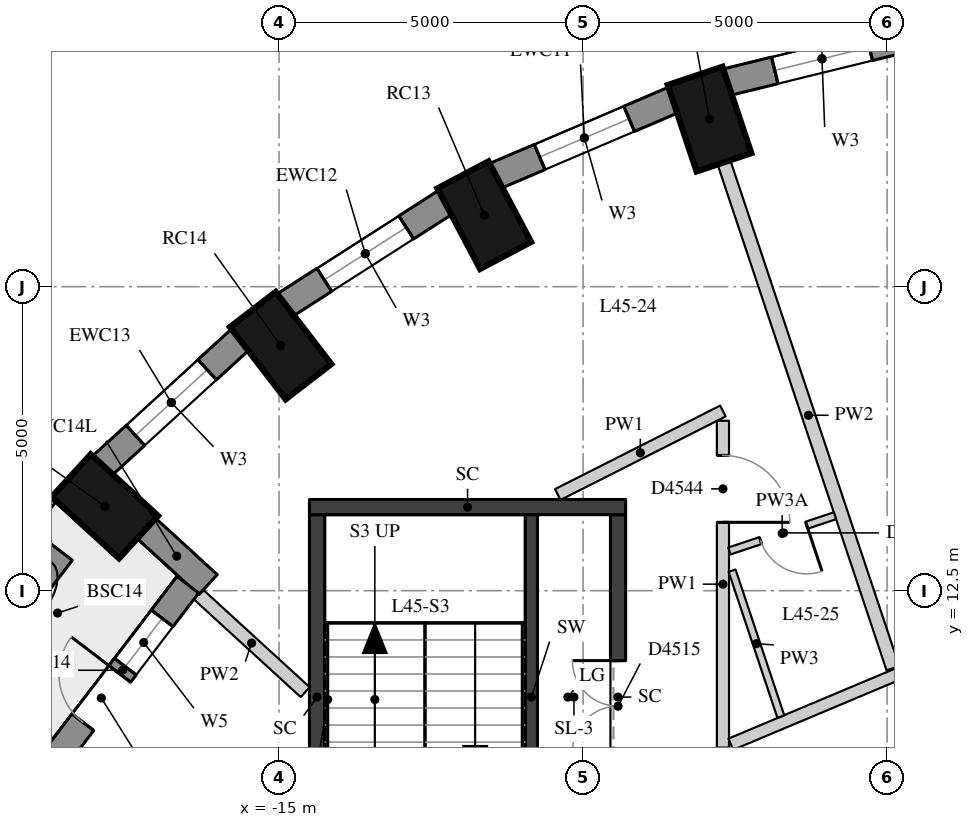
"""IFC4 building model, lengths in metres.
Left out: names, types, materials, properties, quantities, classifications, styles, units other than length and angle.
Written with IfcOpenShell. Run it as: python <this file> out.ifc"""

import sys

from ifc_helpers import new_model, si_unit, direction, frame, frame_2d, origin, origin_2d, place, context, subcontext, project, spatial, rectangle, extrude, element, fill, save


model = new_model("IFC4")
c1 = context("Model", 3, precision=1e-05, world=origin(), true_north=direction((0.0, 1.0)))
c2 = subcontext(c1, "Body", "Model", "MODEL_VIEW")
j1 = project(units=[si_unit("LENGTHUNIT", "METRE"), si_unit("PLANEANGLEUNIT", "RADIAN")], contexts=[c1])
p1 = place(None, origin())
s1 = spatial("IfcSite", under=j1, at=p1, CompositionType="ELEMENT")
p2 = place(p1, origin())
s2 = spatial("IfcBuilding", under=s1, at=p2, CompositionType="ELEMENT")
p3 = place(p2, frame((0.0, 0.0, 161.6)))
s3 = spatial("IfcBuildingStorey", under=s2, at=p3, CompositionType="ELEMENT", Elevation=161.6)
for number, where, z_axis, x_axis in (
    (1, (-7.92, 20.256, 0.0), (0.0, 0.0, 1.0), (-0.317, 0.949, 0.0)),
    (2, (-11.625, 18.676, 0.0), (0.0, 0.0, 1.0), (-0.468, 0.884, 0.0)),
    (3, (-14.973, 16.532, 0.0), (0.0, 0.0, 1.0), (-0.61, 0.792, 0.0)),
    (4, (-17.864, 13.888, 0.0), (0.0, 0.0, 1.0), (-0.738, 0.675, 0.0)),
):
    element("IfcColumn", number, at=place(p3, frame(where, z_axis=z_axis, x_axis=x_axis)), inside=s3, PredefinedType="COLUMN", context=c2, shape_type="SweptSolid", body=[
        extrude(rectangle(XDim=1.5, YDim=0.95, at=origin_2d()), origin(), (0.0, 0.0, 1.0), 3.3),
    ])
p4 = place(p3, frame((-4.499, 21.633, 0.0), z_axis=(0.0, 0.0, 1.0), x_axis=(-0.971232901476, -0.238131583563, 0.0)))
e5 = element("IfcWall", 5, at=p4, inside=s3, PredefinedType="SOLIDWALL", context=c2, shape_type="SweptSolid", body=[
    extrude(rectangle(XDim=3.237, YDim=0.45, at=frame_2d((1.618, 0.0))), origin(), (0.0, 0.0, 1.0), 3.02),
])
p5 = place(p4, frame((0.818, 0.0, 0.4)))
e6 = element("IfcOpeningElement", 6, at=p5, cuts=e5, PredefinedType="OPENING", context=c2, shape_type="SweptSolid", body=[
    extrude(rectangle(XDim=1.6, YDim=1.75, at=frame_2d((0.8, 0.875))), frame((0.0, 0.235, 0.0), z_axis=(0.0, -1.0, 0.0), x_axis=(1.0, 0.0, 0.0)), (0.0, 0.0, 1.0), 0.47),
])
p6 = place(p3, frame((-8.506, 20.574, 0.0), z_axis=(0.0, 0.0, 1.0), x_axis=(-0.919798725687, -0.392390499663, 0.0)))
e7 = element("IfcWall", 7, at=p6, inside=s3, PredefinedType="SOLIDWALL", context=c2, shape_type="SweptSolid", body=[
    extrude(rectangle(XDim=3.2, YDim=0.45, at=frame_2d((1.6, 0.0))), origin(), (0.0, 0.0, 1.0), 3.02),
])
p7 = place(p6, frame((0.8, 0.0, 0.4)))
e8 = element("IfcOpeningElement", 8, at=p7, cuts=e7, PredefinedType="OPENING", context=c2, shape_type="SweptSolid", body=[
    extrude(rectangle(XDim=1.6, YDim=1.75, at=frame_2d((0.8, 0.875))), frame((0.0, 0.235, 0.0), z_axis=(0.0, -1.0, 0.0), x_axis=(1.0, 0.0, 0.0)), (0.0, 0.0, 1.0), 0.47),
])
p8 = place(p3, frame((-12.255, 18.893, 0.0), z_axis=(0.0, 0.0, 1.0), x_axis=(-0.842030726237, -0.539429565442, 0.0)))
e9 = element("IfcWall", 9, at=p8, inside=s3, PredefinedType="SOLIDWALL", context=c2, shape_type="SweptSolid", body=[
    extrude(rectangle(XDim=3.151, YDim=0.45, at=frame_2d((1.576, 0.0))), origin(), (0.0, 0.0, 1.0), 3.02),
])
p9 = place(p8, frame((0.776, 0.0, 0.4)))
e10 = element("IfcOpeningElement", 10, at=p9, cuts=e9, PredefinedType="OPENING", context=c2, shape_type="SweptSolid", body=[
    extrude(rectangle(XDim=1.6, YDim=1.75, at=frame_2d((0.8, 0.875))), frame((0.0, 0.235, 0.0), z_axis=(0.0, -1.0, 0.0), x_axis=(1.0, 0.0, 0.0)), (0.0, 0.0, 1.0), 0.47),
])
p10 = place(p3, frame((-15.63, 16.639, 0.0), z_axis=(0.0, 0.0, 1.0), x_axis=(-0.737808755941, -0.675009807082, 0.0)))
e11 = element("IfcWall", 11, at=p10, inside=s3, PredefinedType="SOLIDWALL", context=c2, shape_type="SweptSolid", body=[
    extrude(rectangle(XDim=3.094, YDim=0.45, at=frame_2d((1.547, 0.0))), origin(), (0.0, 0.0, 1.0), 3.02),
])
p11 = place(p10, frame((0.747, 0.0, 0.4)))
e12 = element("IfcOpeningElement", 12, at=p11, cuts=e11, PredefinedType="OPENING", context=c2, shape_type="SweptSolid", body=[
    extrude(rectangle(XDim=1.6, YDim=1.75, at=frame_2d((0.8, 0.875))), frame((0.0, 0.235, 0.0), z_axis=(0.0, -1.0, 0.0), x_axis=(1.0, 0.0, 0.0)), (0.0, 0.0, 1.0), 0.47),
])
p12 = place(p3, frame((-17.195, 13.537, 0.0), z_axis=(0.0, 0.0, 1.0), x_axis=(0.737918885826, -0.674889411638, 0.0)))
e13 = element("IfcWall", 13, at=p12, inside=s3, PredefinedType="SOLIDWALL", context=c2, shape_type="SweptSolid", body=[
    extrude(rectangle(XDim=1.391, YDim=0.45, at=frame_2d((0.695, 0.0))), origin(), (0.0, 0.0, 1.0), 3.02),
])
p13 = place(p3, frame((-16.501, 12.598, 0.0), z_axis=(0.0, 0.0, 1.0), x_axis=(-0.606778881252, -0.794870674554, 0.0)))
e14 = element("IfcWall", 14, at=p13, inside=s3, PredefinedType="SOLIDWALL", context=c2, shape_type="SweptSolid", body=[
    extrude(rectangle(XDim=3.538, YDim=0.45, at=frame_2d((1.769, 0.0))), origin(), (0.0, 0.0, 1.0), 3.02),
])
p14 = place(p13, frame((0.694, 0.0, 0.4)))
e15 = element("IfcOpeningElement", 15, at=p14, cuts=e14, PredefinedType="OPENING", context=c2, shape_type="SweptSolid", body=[
    extrude(rectangle(XDim=1.0, YDim=1.75, at=frame_2d((0.5, 0.875))), frame((0.0, 0.235, 0.0), z_axis=(0.0, -1.0, 0.0), x_axis=(1.0, 0.0, 0.0)), (0.0, 0.0, 1.0), 0.47),
])
p15 = place(p13, frame((1.844, 0.0, 0.0)))
e16 = element("IfcOpeningElement", 16, at=p15, cuts=e14, PredefinedType="OPENING", context=c2, shape_type="SweptSolid", body=[
    extrude(rectangle(XDim=1.0, YDim=2.15, at=frame_2d((0.5, 1.075))), frame((0.0, 0.235, 0.0), z_axis=(0.0, -1.0, 0.0), x_axis=(1.0, 0.0, 0.0)), (0.0, 0.0, 1.0), 0.47),
])
p16 = place(p3, frame((-18.626, 9.82, 0.0), z_axis=(0.0, 0.0, 1.0), x_axis=(-0.453241970186, -0.891387523169, 0.0)))
e17 = element("IfcWall", 17, at=p16, inside=s3, PredefinedType="SOLIDWALL", context=c2, shape_type="SweptSolid", body=[
    extrude(rectangle(XDim=3.493, YDim=0.45, at=frame_2d((1.747, 0.0))), origin(), (0.0, 0.0, 1.0), 3.02),
])
p17 = place(p16, frame((0.672, 0.0, 0.4)))
e18 = element("IfcOpeningElement", 18, at=p17, cuts=e17, PredefinedType="OPENING", context=c2, shape_type="SweptSolid", body=[
    extrude(rectangle(XDim=1.0, YDim=1.75, at=frame_2d((0.5, 0.875))), frame((0.0, 0.235, 0.0), z_axis=(0.0, -1.0, 0.0), x_axis=(1.0, 0.0, 0.0)), (0.0, 0.0, 1.0), 0.47),
])
p18 = place(p16, frame((1.822, 0.0, 0.0)))
e19 = element("IfcOpeningElement", 19, at=p18, cuts=e17, PredefinedType="OPENING", context=c2, shape_type="SweptSolid", body=[
    extrude(rectangle(XDim=1.0, YDim=2.15, at=frame_2d((0.5, 1.075))), frame((0.0, 0.235, 0.0), z_axis=(0.0, -1.0, 0.0), x_axis=(1.0, 0.0, 0.0)), (0.0, 0.0, 1.0), 0.47),
])
p19 = place(p3, frame((-18.678, 13.214, 0.0), z_axis=(0.0, 0.0, 1.0), x_axis=(-0.607762189494, -0.794119084912, 0.0)))
e20 = element("IfcWall", 20, at=p19, inside=s3, PredefinedType="USERDEFINED", context=c2, shape_type="SweptSolid", body=[
    extrude(rectangle(XDim=1.8, YDim=0.7, at=frame_2d((0.9, 0.0))), origin(), (0.0, 0.0, 1.0), 0.75),
])
p20 = place(p3, frame((-10.85, 7.75, 0.0), z_axis=(0.0, 0.0, 1.0), x_axis=(0.0, 1.0, 0.0)))
e21 = element("IfcWall", 21, at=p20, inside=s3, PredefinedType="SHEAR", context=c2, shape_type="SweptSolid", body=[
    extrude(rectangle(XDim=6.0, YDim=0.2, at=frame_2d((3.0, 0.0))), origin(), (0.0, 0.0, 1.0), 3.02),
])
p21 = place(p20, frame((0.1, 0.0, 0.0)))
e22 = element("IfcOpeningElement", 22, at=p21, cuts=e21, PredefinedType="OPENING", context=c2, shape_type="SweptSolid", body=[
    extrude(rectangle(XDim=1.5, YDim=2.1, at=frame_2d((0.75, 1.05))), frame((0.0, 0.11, 0.0), z_axis=(0.0, -1.0, 0.0), x_axis=(1.0, 0.0, 0.0)), (0.0, 0.0, 1.0), 0.22),
])
p22 = place(p3, frame((-14.375, 7.75, -0.28), z_axis=(0.0, 0.0, 1.0), x_axis=(0.0, 1.0, 0.0)))
e23 = element("IfcWall", 23, at=p22, inside=s3, PredefinedType="SHEAR", context=c2, shape_type="SweptSolid", body=[
    extrude(rectangle(XDim=6.0, YDim=0.25, at=frame_2d((3.0, 0.0))), origin(), (0.0, 0.0, 1.0), 3.3),
])
p23 = place(p3, frame((-9.425, 7.75, -0.28), z_axis=(0.0, 0.0, 1.0), x_axis=(0.0, 1.0, 0.0)))
e24 = element("IfcWall", 24, at=p23, inside=s3, PredefinedType="SHEAR", context=c2, shape_type="SweptSolid", body=[
    extrude(rectangle(XDim=6.0, YDim=0.25, at=frame_2d((3.0, 0.0))), origin(), (0.0, 0.0, 1.0), 3.3),
])
p24 = place(p23, frame((2.1, 0.0, 0.28)))
e25 = element("IfcOpeningElement", 25, at=p24, cuts=e24, PredefinedType="OPENING", context=c2, shape_type="SweptSolid", body=[
    extrude(rectangle(XDim=1.5, YDim=2.1, at=frame_2d((0.75, 1.05))), frame((0.0, 0.135, 0.0), z_axis=(0.0, -1.0, 0.0), x_axis=(1.0, 0.0, 0.0)), (0.0, 0.0, 1.0), 0.27),
])
p25 = place(p3, frame((-14.5, 13.875, -0.28), z_axis=(0.0, 0.0, 1.0), x_axis=(1.0, 0.0, 0.0)))
e26 = element("IfcWall", 26, at=p25, inside=s3, PredefinedType="SHEAR", context=c2, shape_type="SweptSolid", body=[
    extrude(rectangle(XDim=5.2, YDim=0.25, at=frame_2d((2.6, 0.0))), origin(), (0.0, 0.0, 1.0), 3.3),
])
p26 = place(p3, frame((-10.416, 14.082, 0.0), z_axis=(0.0, 0.0, 1.0), x_axis=(0.892396808139, 0.451251522793, 0.0)))
e27 = element("IfcWall", 27, at=p26, inside=s3, PredefinedType="PARTITIONING", context=c2, shape_type="SweptSolid", body=[
    extrude(rectangle(XDim=3.044, YDim=0.2, at=frame_2d((1.522, 0.0))), origin(), (0.0, 0.0, 1.0), 3.02),
])
p27 = place(p3, frame((-7.7, 15.295, 0.0), z_axis=(0.0, 0.0, 1.0), x_axis=(0.0, -1.0, 0.0)))
e28 = element("IfcWall", 28, at=p27, inside=s3, PredefinedType="PARTITIONING", context=c2, shape_type="SweptSolid", body=[
    extrude(rectangle(XDim=5.375, YDim=0.2, at=frame_2d((2.688, 0.0))), origin(), (0.0, 0.0, 1.0), 3.02),
])
p28 = place(p27, frame((0.57, 0.0, 0.0)))
e29 = element("IfcOpeningElement", 29, at=p28, cuts=e28, PredefinedType="OPENING", context=c2, shape_type="SweptSolid", body=[
    extrude(rectangle(XDim=1.1, YDim=2.1, at=frame_2d((0.55, 1.05))), frame((0.0, 0.11, 0.0), z_axis=(0.0, -1.0, 0.0), x_axis=(1.0, 0.0, 0.0)), (0.0, 0.0, 1.0), 0.22),
])
p29 = place(p3, frame((-7.57, 9.975, 0.0), z_axis=(0.0, 0.0, 1.0), x_axis=(0.921815879705, 0.387628022624, 0.0)))
e30 = element("IfcWall", 30, at=p29, inside=s3, PredefinedType="PARTITIONING", context=c2, shape_type="SweptSolid", body=[
    extrude(rectangle(XDim=8.321, YDim=0.2, at=frame_2d((4.16, 0.0))), origin(), (0.0, 0.0, 1.0), 3.02),
])
p30 = place(p29, frame((4.721, 0.0, 0.0)))
e31 = element("IfcOpeningElement", 31, at=p30, cuts=e30, PredefinedType="OPENING", context=c2, shape_type="SweptSolid", body=[
    extrude(rectangle(XDim=1.8, YDim=2.1, at=frame_2d((0.9, 1.05))), frame((0.0, 0.11, 0.0), z_axis=(0.0, -1.0, 0.0), x_axis=(1.0, 0.0, 0.0)), (0.0, 0.0, 1.0), 0.22),
])
p31 = place(p3, frame((-7.683, 19.545, 0.0), z_axis=(0.0, 0.0, 1.0), x_axis=(0.316703700313, -0.948524520615, 0.0)))
e32 = element("IfcWall", 32, at=p31, inside=s3, PredefinedType="PARTITIONING", context=c2, shape_type="SweptSolid", body=[
    extrude(rectangle(XDim=8.771, YDim=0.22, at=frame_2d((4.385, 0.0))), origin(), (0.0, 0.0, 1.0), 3.02),
])
p32 = place(p3, frame((-16.334, 12.445, 0.0), z_axis=(0.0, 0.0, 1.0), x_axis=(0.737857346278, -0.674956692347, 0.0)))
e33 = element("IfcWall", 33, at=p32, inside=s3, PredefinedType="PARTITIONING", context=c2, shape_type="SweptSolid", body=[
    extrude(rectangle(XDim=2.391, YDim=0.22, at=frame_2d((1.195, 0.0))), origin(), (0.0, 0.0, 1.0), 3.02),
])
p33 = place(p3, frame((-6.748, 10.429, 0.0), z_axis=(0.0, 0.0, 1.0), x_axis=(-0.316690754737, 0.948528842927, 0.0)))
e34 = element("IfcWall", 34, at=p33, inside=s3, PredefinedType="PARTITIONING", context=c2, shape_type="SweptSolid", body=[
    extrude(rectangle(XDim=2.531, YDim=0.12, at=frame_2d((1.266, 0.0))), origin(), (0.0, 0.0, 1.0), 3.02),
])
p34 = place(p3, frame((-7.594, 13.153, 0.0), z_axis=(0.0, 0.0, 1.0), x_axis=(0.948563158378, 0.316587957079, 0.0)))
e35 = element("IfcWall", 35, at=p34, inside=s3, PredefinedType="PARTITIONING", context=c2, shape_type="SweptSolid", body=[
    extrude(rectangle(XDim=1.83, YDim=0.12, at=frame_2d((0.915, 0.0))), origin(), (0.0, 0.0, 1.0), 2.57),
])
p35 = place(p34, frame((0.54, 0.0, 0.0)))
e36 = element("IfcOpeningElement", 36, at=p35, cuts=e35, PredefinedType="OPENING", context=c2, shape_type="SweptSolid", body=[
    extrude(rectangle(XDim=0.8, YDim=2.1, at=frame_2d((0.4, 1.05))), frame((0.0, 0.07, 0.0), z_axis=(0.0, -1.0, 0.0), x_axis=(1.0, 0.0, 0.0)), (0.0, 0.0, 1.0), 0.14),
])
p36 = place(p5, origin())
e37 = element("IfcWindow", 37, at=p36, inside=s3, PartitioningType="SINGLE_PANEL", PredefinedType="WINDOW", context=c2, shape_type="SweptSolid", body=[
    extrude(rectangle(XDim=1.6, YDim=1.75, at=frame_2d((0.8, 0.875))), frame((0.0, 0.035, 0.0), z_axis=(0.0, -1.0, 0.0), x_axis=(1.0, 0.0, 0.0)), (0.0, 0.0, 1.0), 0.06),
])
fill(e6, e37)
p37 = place(p7, origin())
e38 = element("IfcWindow", 38, at=p37, inside=s3, PartitioningType="SINGLE_PANEL", PredefinedType="WINDOW", context=c2, shape_type="SweptSolid", body=[
    extrude(rectangle(XDim=1.6, YDim=1.75, at=frame_2d((0.8, 0.875))), frame((0.0, 0.035, 0.0), z_axis=(0.0, -1.0, 0.0), x_axis=(1.0, 0.0, 0.0)), (0.0, 0.0, 1.0), 0.06),
])
fill(e8, e38)
p38 = place(p9, origin())
e39 = element("IfcWindow", 39, at=p38, inside=s3, PartitioningType="SINGLE_PANEL", PredefinedType="WINDOW", context=c2, shape_type="SweptSolid", body=[
    extrude(rectangle(XDim=1.6, YDim=1.75, at=frame_2d((0.8, 0.875))), frame((0.0, 0.035, 0.0), z_axis=(0.0, -1.0, 0.0), x_axis=(1.0, 0.0, 0.0)), (0.0, 0.0, 1.0), 0.06),
])
fill(e10, e39)
p39 = place(p11, origin())
e40 = element("IfcWindow", 40, at=p39, inside=s3, PartitioningType="SINGLE_PANEL", PredefinedType="WINDOW", context=c2, shape_type="SweptSolid", body=[
    extrude(rectangle(XDim=1.6, YDim=1.75, at=frame_2d((0.8, 0.875))), frame((0.0, 0.035, 0.0), z_axis=(0.0, -1.0, 0.0), x_axis=(1.0, 0.0, 0.0)), (0.0, 0.0, 1.0), 0.06),
])
fill(e12, e40)
p40 = place(p14, origin())
e41 = element("IfcWindow", 41, at=p40, inside=s3, PartitioningType="SINGLE_PANEL", PredefinedType="WINDOW", context=c2, shape_type="SweptSolid", body=[
    extrude(rectangle(XDim=1.0, YDim=1.75, at=frame_2d((0.5, 0.875))), frame((0.0, 0.035, 0.0), z_axis=(0.0, -1.0, 0.0), x_axis=(1.0, 0.0, 0.0)), (0.0, 0.0, 1.0), 0.06),
])
fill(e15, e41)
p41 = place(p15, frame((1.0, 0.0, 0.0), z_axis=(0.0, 0.0, 1.0), x_axis=(-1.0, 0.0, 0.0)))
e42 = element("IfcDoor", 42, at=p41, inside=s3, OperationType="SINGLE_SWING_RIGHT", PredefinedType="DOOR", context=c2, shape_type="SweptSolid", body=[
    extrude(rectangle(XDim=1.0, YDim=2.15, at=frame_2d((0.5, 1.075))), frame((0.0, 0.075, 0.0), z_axis=(0.0, -1.0, 0.0), x_axis=(1.0, 0.0, 0.0)), (0.0, 0.0, 1.0), 0.05),
])
fill(e16, e42)
p42 = place(p24, origin())
e43 = element("IfcDoor", 43, at=p42, inside=s3, OperationType="DOUBLE_DOOR_SINGLE_SWING", PredefinedType="DOOR", context=c2, shape_type="SweptSolid", body=[
    extrude(rectangle(XDim=1.5, YDim=2.1, at=frame_2d((0.75, 1.05))), frame((0.0, 0.025, 0.0), z_axis=(0.0, -1.0, 0.0), x_axis=(1.0, 0.0, 0.0)), (0.0, 0.0, 1.0), 0.05),
])
fill(e25, e43)
p43 = place(p28, origin())
e44 = element("IfcDoor", 44, at=p43, inside=s3, OperationType="SINGLE_SWING_RIGHT", PredefinedType="DOOR", context=c2, shape_type="SweptSolid", body=[
    extrude(rectangle(XDim=1.1, YDim=2.1, at=frame_2d((0.55, 1.05))), frame((0.0, 0.025, 0.0), z_axis=(0.0, -1.0, 0.0), x_axis=(1.0, 0.0, 0.0)), (0.0, 0.0, 1.0), 0.05),
])
fill(e29, e44)
p44 = place(p35, origin())
e45 = element("IfcDoor", 45, at=p44, inside=s3, OperationType="SINGLE_SWING_LEFT", PredefinedType="DOOR", context=c2, shape_type="SweptSolid", body=[
    extrude(rectangle(XDim=0.8, YDim=2.1, at=frame_2d((0.4, 1.05))), frame((0.0, 0.025, 0.0), z_axis=(0.0, -1.0, 0.0), x_axis=(1.0, 0.0, 0.0)), (0.0, 0.0, 1.0), 0.05),
])
fill(e36, e45)
save(model, sys.argv[1])
